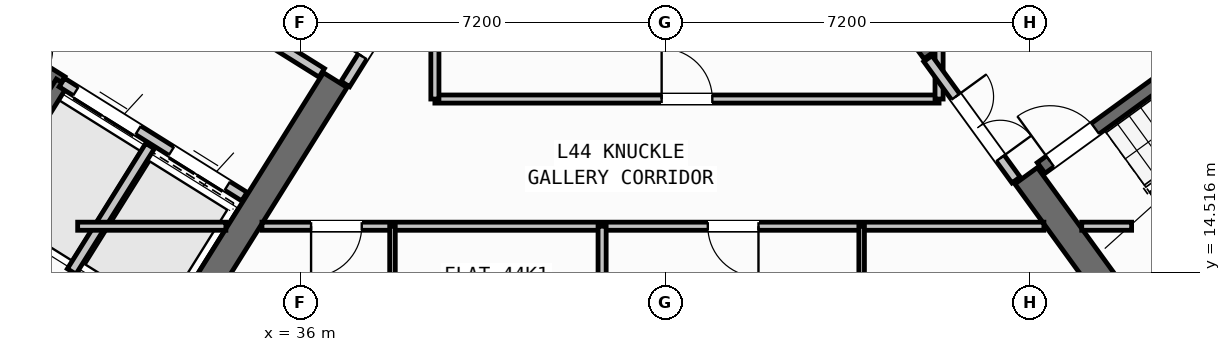
"""IFC4 building model, lengths in metres.
Left out: names, types, materials, properties, quantities, classifications, styles, units other than length and angle.
Written with IfcOpenShell. Run it as: python <this file> out.ifc"""

import sys

from ifc_helpers import new_model, si_unit, direction, frame, frame_2d, origin, place, context, subcontext, project, spatial, rectangle, extrude, source, transform, mapped, element, fill, save


model = new_model("IFC4")
c1 = context("Model", 3, precision=1e-05, world=origin(), true_north=direction((0.0, 1.0)))
c2 = subcontext(c1, "Body", "Model", "MODEL_VIEW")
j1 = project(units=[si_unit("LENGTHUNIT", "METRE"), si_unit("PLANEANGLEUNIT", "RADIAN")], contexts=[c1])
p1 = place(None, origin())
s1 = spatial("IfcSite", under=j1, at=p1, CompositionType="ELEMENT")
p2 = place(p1, origin())
s2 = spatial("IfcBuilding", under=s1, at=p2, CompositionType="ELEMENT")
p3 = place(p2, frame((0.0, 0.0, 174.9)))
s3 = spatial("IfcBuildingStorey", under=s2, at=p3, CompositionType="ELEMENT", Elevation=174.9)
p4 = place(p3, frame((33.366, 12.477, 0.0), z_axis=(0.0, 0.0, 1.0), x_axis=(-0.848047359947, 0.529920442413, 0.0)))
e1 = element("IfcWall", 1, at=p4, inside=s3, PredefinedType="SHEAR", context=c2, shape_type="SweptSolid", body=[
    extrude(rectangle(XDim=13.14, YDim=0.55, at=frame_2d((6.57, 0.0))), origin(), (0.0, 0.0, 1.0), 4.22),
])
p5 = place(p3, frame((36.683, 18.304, 0.0), z_axis=(0.0, 0.0, 1.0), x_axis=(-0.529896466841, -0.848062341122, 0.0)))
e2 = element("IfcWall", 2, at=p5, inside=s3, PredefinedType="SHEAR", context=c2, shape_type="SweptSolid", body=[
    extrude(rectangle(XDim=6.425, YDim=0.55, at=frame_2d((3.212, 0.0))), origin(), (0.0, 0.0, 1.0), 4.22),
])
p6 = place(p3, frame((52.359, 13.14, 0.0), z_axis=(0.0, 0.0, 1.0), x_axis=(0.809014896919, 0.587788139183, 0.0)))
e3 = element("IfcWall", 3, at=p6, inside=s3, PredefinedType="SHEAR", context=c2, shape_type="SweptSolid", body=[
    extrude(rectangle(XDim=12.34, YDim=0.55, at=frame_2d((6.17, 0.0))), origin(), (0.0, 0.0, 1.0), 4.22),
])
p7 = place(p3, frame((52.42, 13.524, 0.0), z_axis=(0.0, 0.0, 1.0), x_axis=(-0.587802113096, 0.809004744015, 0.0)))
e4 = element("IfcWall", 4, at=p7, inside=s3, PredefinedType="SHEAR", context=c2, shape_type="SweptSolid", body=[
    extrude(rectangle(XDim=3.575, YDim=0.55, at=frame_2d((1.788, 0.0))), origin(), (0.0, 0.0, 1.0), 4.22),
])
p8 = place(p3, frame((48.526, 18.884, 0.0), z_axis=(0.0, 0.0, 1.0), x_axis=(-0.587764933797, 0.809031756236, 0.0)))
e5 = element("IfcWall", 5, at=p8, inside=s3, PredefinedType="SHEAR", context=c2, shape_type="SweptSolid", body=[
    extrude(rectangle(XDim=6.425, YDim=0.55, at=frame_2d((3.212, 0.0))), origin(), (0.0, 0.0, 1.0), 4.22),
])
p9 = place(p3, frame((31.28, 18.261, 0.0), z_axis=(0.0, 0.0, 1.0), x_axis=(-0.848051618787, 0.529913626805, 0.0)))
e6 = element("IfcWall", 6, at=p9, inside=s3, PredefinedType="SHEAR", context=c2, shape_type="SweptSolid", body=[
    extrude(rectangle(XDim=7.46, YDim=0.26, at=frame_2d((3.73, 0.0))), origin(), (0.0, 0.0, 1.0), 4.22),
])
p10 = place(p9, frame((0.36, 0.0, 0.0)))
e7 = element("IfcOpeningElement", 7, at=p10, cuts=e6, PredefinedType="OPENING", context=c2, shape_type="SweptSolid", body=[
    extrude(rectangle(XDim=0.86, YDim=2.05, at=frame_2d((0.43, 1.025))), frame((0.0, 0.14, 0.0), z_axis=(0.0, -1.0, 0.0), x_axis=(1.0, 0.0, 0.0)), (0.0, 0.0, 1.0), 0.28),
])
p11 = place(p3, frame((31.288, 18.256, 0.0), z_axis=(0.0, 0.0, 1.0), x_axis=(-0.529943379326, -0.848033026897, 0.0)))
e8 = element("IfcWall", 8, at=p11, inside=s3, PredefinedType="SHEAR", context=c2, shape_type="SweptSolid", body=[
    extrude(rectangle(XDim=3.16, YDim=0.26, at=frame_2d((1.58, 0.0))), origin(), (0.0, 0.0, 1.0), 4.22),
])
p12 = place(p3, frame((34.891, 16.005, 0.0), z_axis=(0.0, 0.0, 1.0), x_axis=(-0.848062873452, 0.529895614884, 0.0)))
e9 = element("IfcWall", 9, at=p12, inside=s3, PredefinedType="STANDARD", context=c2, shape_type="SweptSolid", body=[
    extrude(rectangle(XDim=4.248, YDim=0.2, at=frame_2d((2.124, 0.0))), origin(), (0.0, 0.0, 1.0), 4.21),
])
p13 = place(p12, frame((0.398, 0.0, 0.0)))
e10 = element("IfcOpeningElement", 10, at=p13, cuts=e9, PredefinedType="OPENING", context=c2, shape_type="SweptSolid", body=[
    extrude(rectangle(XDim=1.3, YDim=2.2, at=frame_2d((0.65, 1.1))), frame((0.0, 0.11, 0.0), z_axis=(0.0, -1.0, 0.0), x_axis=(1.0, 0.0, 0.0)), (0.0, 0.0, 1.0), 0.22),
])
p14 = place(p12, frame((2.473, 0.0, 0.0)))
e11 = element("IfcOpeningElement", 11, at=p14, cuts=e9, PredefinedType="OPENING", context=c2, shape_type="SweptSolid", body=[
    extrude(rectangle(XDim=1.45, YDim=2.25, at=frame_2d((0.725, 1.125))), frame((0.0, 0.11, 0.0), z_axis=(0.0, -1.0, 0.0), x_axis=(1.0, 0.0, 0.0)), (0.0, 0.0, 1.0), 0.22),
])
p15 = place(p3, frame((36.417, 18.447, 0.0), z_axis=(0.0, 0.0, 1.0), x_axis=(-0.848064879198, 0.529892404805, 0.0)))
e12 = element("IfcWall", 12, at=p15, inside=s3, PredefinedType="STANDARD", context=c2, shape_type="SweptSolid", body=[
    extrude(rectangle(XDim=5.768, YDim=0.2, at=frame_2d((2.884, 0.0))), origin(), (0.0, 0.0, 1.0), 4.21),
])
p16 = place(p15, frame((2.548, 0.0, 0.0)))
e13 = element("IfcOpeningElement", 13, at=p16, cuts=e12, PredefinedType="OPENING", context=c2, shape_type="SweptSolid", body=[
    extrude(rectangle(XDim=1.15, YDim=2.1, at=frame_2d((0.575, 1.05))), frame((0.0, 0.11, 0.0), z_axis=(0.0, -1.0, 0.0), x_axis=(1.0, 0.0, 0.0)), (0.0, 0.0, 1.0), 0.22),
])
p17 = place(p3, frame((33.029, 17.003, 0.0), z_axis=(0.0, 0.0, 1.0), x_axis=(-0.529916267533, -0.848049968695, 0.0)))
e14 = element("IfcWall", 14, at=p17, inside=s3, PredefinedType="STANDARD", context=c2, shape_type="SweptSolid", body=[
    extrude(rectangle(XDim=2.92, YDim=0.2, at=frame_2d((1.46, 0.0))), origin(), (0.0, 0.0, 1.0), 4.21),
])
p18 = place(p3, frame((52.472, 14.013, 0.0), z_axis=(0.0, 0.0, 1.0), x_axis=(0.809028366311, 0.587769599847, 0.0)))
e15 = element("IfcWall", 15, at=p18, inside=s3, PredefinedType="SHEAR", context=c2, shape_type="SweptSolid", body=[
    extrude(rectangle(XDim=7.33, YDim=0.26, at=frame_2d((3.665, 0.0))), origin(), (0.0, 0.0, 1.0), 4.22),
])
p19 = place(p3, frame((50.615, 16.57, 0.0), z_axis=(0.0, 0.0, 1.0), x_axis=(0.809028366311, 0.587769599847, 0.0)))
e16 = element("IfcWall", 16, at=p19, inside=s3, PredefinedType="SHEAR", context=c2, shape_type="SweptSolid", body=[
    extrude(rectangle(XDim=7.33, YDim=0.26, at=frame_2d((3.665, 0.0))), origin(), (0.0, 0.0, 1.0), 4.22),
])
p20 = place(p19, frame((0.22, 0.0, 0.0)))
e17 = element("IfcOpeningElement", 17, at=p20, cuts=e16, PredefinedType="OPENING", context=c2, shape_type="SweptSolid", body=[
    extrude(rectangle(XDim=1.1, YDim=2.1, at=frame_2d((0.55, 1.05))), frame((0.0, 0.14, 0.0), z_axis=(0.0, -1.0, 0.0), x_axis=(1.0, 0.0, 0.0)), (0.0, 0.0, 1.0), 0.28),
])
p21 = place(p3, frame((32.164, 10.374, 0.0), z_axis=(0.0, 0.0, 1.0), x_axis=(-0.848044107957, 0.529925646633, 0.0)))
e18 = element("IfcWall", 18, at=p21, inside=s3, PredefinedType="PARTITIONING", context=c2, shape_type="SweptSolid", body=[
    extrude(rectangle(XDim=15.57, YDim=0.16, at=frame_2d((7.785, 0.0))), origin(), (0.0, 0.0, 1.0), 4.21),
])
p22 = place(p21, frame((10.83, 0.0, 0.0)))
e19 = element("IfcOpeningElement", 19, at=p22, cuts=e18, PredefinedType="OPENING", context=c2, shape_type="SweptSolid", body=[
    extrude(rectangle(XDim=1.0, YDim=2.1, at=frame_2d((0.5, 1.05))), frame((0.0, 0.09, 0.0), z_axis=(0.0, -1.0, 0.0), x_axis=(1.0, 0.0, 0.0)), (0.0, 0.0, 1.0), 0.18),
])
p23 = place(p3, frame((38.451, 20.737, 0.0), z_axis=(0.0, 0.0, 1.0), x_axis=(-0.529924799939, -0.848044637038, 0.0)))
e20 = element("IfcWall", 20, at=p23, inside=s3, PredefinedType="STANDARD", context=c2, shape_type="SweptSolid", body=[
    extrude(rectangle(XDim=2.96, YDim=0.2, at=frame_2d((1.48, 0.0))), origin(), (0.0, 0.0, 1.0), 2.395),
])
p24 = place(p23, frame((1.46, 0.0, 0.0)))
e21 = element("IfcOpeningElement", 21, at=p24, cuts=e20, PredefinedType="OPENING", context=c2, shape_type="SweptSolid", body=[
    extrude(rectangle(XDim=0.86, YDim=2.05, at=frame_2d((0.43, 1.025))), frame((0.0, 0.11, 0.0), z_axis=(0.0, -1.0, 0.0), x_axis=(1.0, 0.0, 0.0)), (0.0, 0.0, 1.0), 0.22),
])
p25 = place(p3, frame((31.6, 15.42, 0.0), z_axis=(0.0, 0.0, 1.0), x_axis=(1.0, 0.0, 0.0)))
e22 = element("IfcWall", 22, at=p25, inside=s3, PredefinedType="PARTITIONING", context=c2, shape_type="SweptSolid", body=[
    extrude(rectangle(XDim=2.925, YDim=0.16, at=frame_2d((1.462, 0.0))), origin(), (0.0, 0.0, 1.0), 4.21),
])
p26 = place(p3, frame((35.237, 15.42, 0.0), z_axis=(0.0, 0.0, 1.0), x_axis=(1.0, 0.0, 0.0)))
e23 = element("IfcWall", 23, at=p26, inside=s3, PredefinedType="PARTITIONING", context=c2, shape_type="SweptSolid", body=[
    extrude(rectangle(XDim=15.432, YDim=0.16, at=frame_2d((7.716, 0.0))), origin(), (0.0, 0.0, 1.0), 4.21),
])
p27 = place(p26, frame((0.969, 0.0, 0.0)))
e24 = element("IfcOpeningElement", 24, at=p27, cuts=e23, PredefinedType="OPENING", context=c2, shape_type="SweptSolid", body=[
    extrude(rectangle(XDim=1.0, YDim=2.1, at=frame_2d((0.5, 1.05))), frame((0.0, 0.09, 0.0), z_axis=(0.0, -1.0, 0.0), x_axis=(1.0, 0.0, 0.0)), (0.0, 0.0, 1.0), 0.18),
])
p28 = place(p26, frame((8.799, 0.0, 0.0)))
e25 = element("IfcOpeningElement", 25, at=p28, cuts=e23, PredefinedType="OPENING", context=c2, shape_type="SweptSolid", body=[
    extrude(rectangle(XDim=1.0, YDim=2.1, at=frame_2d((0.5, 1.05))), frame((0.0, 0.09, 0.0), z_axis=(0.0, -1.0, 0.0), x_axis=(1.0, 0.0, 0.0)), (0.0, 0.0, 1.0), 0.18),
])
p29 = place(p3, frame((51.416, 15.42, 0.0), z_axis=(0.0, 0.0, 1.0), x_axis=(1.0, 0.0, 0.0)))
e26 = element("IfcWall", 26, at=p29, inside=s3, PredefinedType="PARTITIONING", context=c2, shape_type="SweptSolid", body=[
    extrude(rectangle(XDim=0.984, YDim=0.16, at=frame_2d((0.492, 0.0))), origin(), (0.0, 0.0, 1.0), 4.21),
])
p30 = place(p3, frame((38.65, 17.93, 0.0), z_axis=(0.0, 0.0, 1.0), x_axis=(1.0, 0.0, 0.0)))
e27 = element("IfcWall", 27, at=p30, inside=s3, PredefinedType="PARTITIONING", context=c2, shape_type="SweptSolid", body=[
    extrude(rectangle(XDim=9.95, YDim=0.16, at=frame_2d((4.975, 0.0))), origin(), (0.0, 0.0, 1.0), 4.21),
])
p31 = place(p30, frame((4.475, 0.0, 0.0)))
e28 = element("IfcOpeningElement", 28, at=p31, cuts=e27, PredefinedType="OPENING", context=c2, shape_type="SweptSolid", body=[
    extrude(rectangle(XDim=1.0, YDim=2.1, at=frame_2d((0.5, 1.05))), frame((0.0, 0.09, 0.0), z_axis=(0.0, -1.0, 0.0), x_axis=(1.0, 0.0, 0.0)), (0.0, 0.0, 1.0), 0.18),
])
p32 = place(p3, frame((38.65, 17.93, 0.0), z_axis=(0.0, 0.0, 1.0), x_axis=(0.0, 1.0, 0.0)))
e29 = element("IfcWall", 29, at=p32, inside=s3, PredefinedType="PARTITIONING", context=c2, shape_type="SweptSolid", body=[
    extrude(rectangle(XDim=2.951, YDim=0.16, at=frame_2d((1.476, 0.0))), origin(), (0.0, 0.0, 1.0), 4.21),
])
p33 = place(p3, frame((48.6, 17.93, 0.0), z_axis=(0.0, 0.0, 1.0), x_axis=(0.0, 1.0, 0.0)))
e30 = element("IfcWall", 30, at=p33, inside=s3, PredefinedType="PARTITIONING", context=c2, shape_type="SweptSolid", body=[
    extrude(rectangle(XDim=0.993, YDim=0.16, at=frame_2d((0.496, 0.0))), origin(), (0.0, 0.0, 1.0), 4.21),
])
p34 = place(p3, frame((50.119, 16.333, 0.0), z_axis=(0.0, 0.0, 1.0), x_axis=(-0.587749856981, 0.809042709391, 0.0)))
e31 = element("IfcWall", 31, at=p34, inside=s3, PredefinedType="STANDARD", context=c2, shape_type="SweptSolid", body=[
    extrude(rectangle(XDim=2.96, YDim=0.2, at=frame_2d((1.48, 0.0))), origin(), (0.0, 0.0, 1.0), 2.395),
])
p35 = place(p34, frame((0.53, 0.0, 0.0)))
e32 = element("IfcOpeningElement", 32, at=p35, cuts=e31, PredefinedType="OPENING", context=c2, shape_type="SweptSolid", body=[
    extrude(rectangle(XDim=1.5, YDim=2.15, at=frame_2d((0.75, 1.075))), frame((0.0, 0.11, 0.0), z_axis=(0.0, -1.0, 0.0), x_axis=(1.0, 0.0, 0.0)), (0.0, 0.0, 1.0), 0.22),
])
p36 = place(p3, frame((41.95, 1.96, 0.0), z_axis=(0.0, 0.0, 1.0), x_axis=(0.0, 1.0, 0.0)))
e33 = element("IfcWall", 33, at=p36, inside=s3, PredefinedType="PARTITIONING", context=c2, shape_type="SweptSolid", body=[
    extrude(rectangle(XDim=13.46, YDim=0.16, at=frame_2d((6.73, 0.0))), origin(), (0.0, 0.0, 1.0), 4.21),
])
p37 = place(p3, frame((37.813, 1.96, 0.0), z_axis=(0.0, 0.0, 1.0), x_axis=(0.0, 1.0, 0.0)))
e34 = element("IfcWall", 34, at=p37, inside=s3, PredefinedType="PARTITIONING", context=c2, shape_type="SweptSolid", body=[
    extrude(rectangle(XDim=13.46, YDim=0.11, at=frame_2d((6.73, 0.0))), origin(), (0.0, 0.0, 1.0), 4.21),
])
p38 = place(p37, frame((5.5, 0.0, 0.0)))
e35 = element("IfcOpeningElement", 35, at=p38, cuts=e34, PredefinedType="OPENING", context=c2, shape_type="SweptSolid", body=[
    extrude(rectangle(XDim=0.92, YDim=2.08, at=frame_2d((0.46, 1.04))), frame((0.0, 0.065, 0.0), z_axis=(0.0, -1.0, 0.0), x_axis=(1.0, 0.0, 0.0)), (0.0, 0.0, 1.0), 0.13),
])
p39 = place(p37, frame((10.67, 0.0, 0.0)))
e36 = element("IfcOpeningElement", 36, at=p39, cuts=e34, PredefinedType="OPENING", context=c2, shape_type="SweptSolid", body=[
    extrude(rectangle(XDim=0.88, YDim=2.08, at=frame_2d((0.44, 1.04))), frame((0.0, 0.065, 0.0), z_axis=(0.0, -1.0, 0.0), x_axis=(1.0, 0.0, 0.0)), (0.0, 0.0, 1.0), 0.13),
])
p40 = place(p3, frame((47.072, 1.96, 0.0), z_axis=(0.0, 0.0, 1.0), x_axis=(0.0, 1.0, 0.0)))
e37 = element("IfcWall", 37, at=p40, inside=s3, PredefinedType="PARTITIONING", context=c2, shape_type="SweptSolid", body=[
    extrude(rectangle(XDim=13.46, YDim=0.11, at=frame_2d((6.73, 0.0))), origin(), (0.0, 0.0, 1.0), 4.21),
])
p41 = place(p40, frame((6.6, 0.0, 0.0)))
e38 = element("IfcOpeningElement", 38, at=p41, cuts=e37, PredefinedType="OPENING", context=c2, shape_type="SweptSolid", body=[
    extrude(rectangle(XDim=0.92, YDim=2.08, at=frame_2d((0.46, 1.04))), frame((0.0, 0.065, 0.0), z_axis=(0.0, -1.0, 0.0), x_axis=(1.0, 0.0, 0.0)), (0.0, 0.0, 1.0), 0.13),
])
p42 = place(p40, frame((11.32, 0.0, 0.0)))
e39 = element("IfcOpeningElement", 39, at=p42, cuts=e37, PredefinedType="OPENING", context=c2, shape_type="SweptSolid", body=[
    extrude(rectangle(XDim=0.88, YDim=2.08, at=frame_2d((0.44, 1.04))), frame((0.0, 0.065, 0.0), z_axis=(0.0, -1.0, 0.0), x_axis=(1.0, 0.0, 0.0)), (0.0, 0.0, 1.0), 0.13),
])
m1 = source(origin(), c2, "Body", "SweptSolid", [
    extrude(rectangle(XDim=1.3, YDim=2.2, at=frame_2d((0.65, 1.1))), frame((0.0, 0.025, 0.0), z_axis=(0.0, -1.0, 0.0), x_axis=(1.0, 0.0, 0.0)), (0.0, 0.0, 1.0), 0.05),
])
p43 = place(p13, origin())
e40 = element("IfcDoor", 40, at=p43, inside=s3, OperationType="DOUBLE_DOOR_SLIDING", PredefinedType="DOOR", context=c2, shape_type="MappedRepresentation", body=[
    mapped(m1, transform((0.0, 0.0, 0.0), scale=1.0)),
])
fill(e10, e40)
m2 = source(origin(), c2, "Body", "SweptSolid", [
    extrude(rectangle(XDim=1.45, YDim=2.25, at=frame_2d((0.725, 1.125))), frame((0.0, 0.025, 0.0), z_axis=(0.0, -1.0, 0.0), x_axis=(1.0, 0.0, 0.0)), (0.0, 0.0, 1.0), 0.05),
])
p44 = place(p14, origin())
e41 = element("IfcDoor", 41, at=p44, inside=s3, OperationType="DOUBLE_DOOR_SLIDING", PredefinedType="DOOR", context=c2, shape_type="MappedRepresentation", body=[
    mapped(m2, transform((0.0, 0.0, 0.0), scale=1.0)),
])
fill(e11, e41)
m3 = source(origin(), c2, "Body", "SweptSolid", [
    extrude(rectangle(XDim=1.1, YDim=2.1, at=frame_2d((0.55, 1.05))), frame((0.0, 0.025, 0.0), z_axis=(0.0, -1.0, 0.0), x_axis=(1.0, 0.0, 0.0)), (0.0, 0.0, 1.0), 0.05),
])
p45 = place(p20, origin())
e42 = element("IfcDoor", 42, at=p45, inside=s3, OperationType="SINGLE_SWING_LEFT", PredefinedType="DOOR", context=c2, shape_type="MappedRepresentation", body=[
    mapped(m3, transform((0.0, 0.0, 0.0), scale=1.0)),
])
fill(e17, e42)
m4 = source(origin(), c2, "Body", "SweptSolid", [
    extrude(rectangle(XDim=1.0, YDim=2.1, at=frame_2d((0.5, 1.05))), frame((0.0, 0.025, 0.0), z_axis=(0.0, -1.0, 0.0), x_axis=(1.0, 0.0, 0.0)), (0.0, 0.0, 1.0), 0.05),
])
p46 = place(p31, origin())
e43 = element("IfcDoor", 43, at=p46, inside=s3, OperationType="SINGLE_SWING_LEFT", PredefinedType="DOOR", context=c2, shape_type="MappedRepresentation", body=[
    mapped(m4, transform((0.0, 0.0, 0.0), scale=1.0)),
])
fill(e28, e43)
m5 = source(origin(), c2, "Body", "SweptSolid", [
    extrude(rectangle(XDim=0.86, YDim=2.05, at=frame_2d((0.43, 1.025))), frame((0.0, 0.025, 0.0), z_axis=(0.0, -1.0, 0.0), x_axis=(1.0, 0.0, 0.0)), (0.0, 0.0, 1.0), 0.05),
])
p47 = place(p24, frame((0.86, 0.0, 0.0), z_axis=(0.0, 0.0, 1.0), x_axis=(-1.0, 0.0, 0.0)))
e44 = element("IfcDoor", 44, at=p47, inside=s3, OperationType="SINGLE_SWING_LEFT", PredefinedType="DOOR", context=c2, shape_type="MappedRepresentation", body=[
    mapped(m5, transform((0.0, 0.0, 0.0), scale=1.0)),
])
fill(e21, e44)
m6 = source(origin(), c2, "Body", "SweptSolid", [
    extrude(rectangle(XDim=1.5, YDim=2.15, at=frame_2d((0.75, 1.075))), frame((0.0, 0.025, 0.0), z_axis=(0.0, -1.0, 0.0), x_axis=(1.0, 0.0, 0.0)), (0.0, 0.0, 1.0), 0.05),
])
p48 = place(p35, frame((1.5, 0.0, 0.0), z_axis=(0.0, 0.0, 1.0), x_axis=(-1.0, 0.0, 0.0)))
e45 = element("IfcDoor", 45, at=p48, inside=s3, OperationType="DOUBLE_DOOR_SINGLE_SWING", PredefinedType="DOOR", context=c2, shape_type="MappedRepresentation", body=[
    mapped(m6, transform((0.0, 0.0, 0.0), scale=1.0)),
])
fill(e32, e45)
p49 = place(p27, frame((1.0, 0.0, 0.0), z_axis=(0.0, 0.0, 1.0), x_axis=(-1.0, 0.0, 0.0)))
e46 = element("IfcDoor", 46, at=p49, inside=s3, OperationType="SINGLE_SWING_RIGHT", PredefinedType="DOOR", context=c2, shape_type="MappedRepresentation", body=[
    mapped(m4, transform((0.0, 0.0, 0.0), scale=1.0)),
])
fill(e24, e46)
p50 = place(p28, frame((1.0, 0.0, 0.0), z_axis=(0.0, 0.0, 1.0), x_axis=(-1.0, 0.0, 0.0)))
e47 = element("IfcDoor", 47, at=p50, inside=s3, OperationType="SINGLE_SWING_LEFT", PredefinedType="DOOR", context=c2, shape_type="MappedRepresentation", body=[
    mapped(m4, transform((0.0, 0.0, 0.0), scale=1.0)),
])
fill(e25, e47)
save(model, sys.argv[1])
